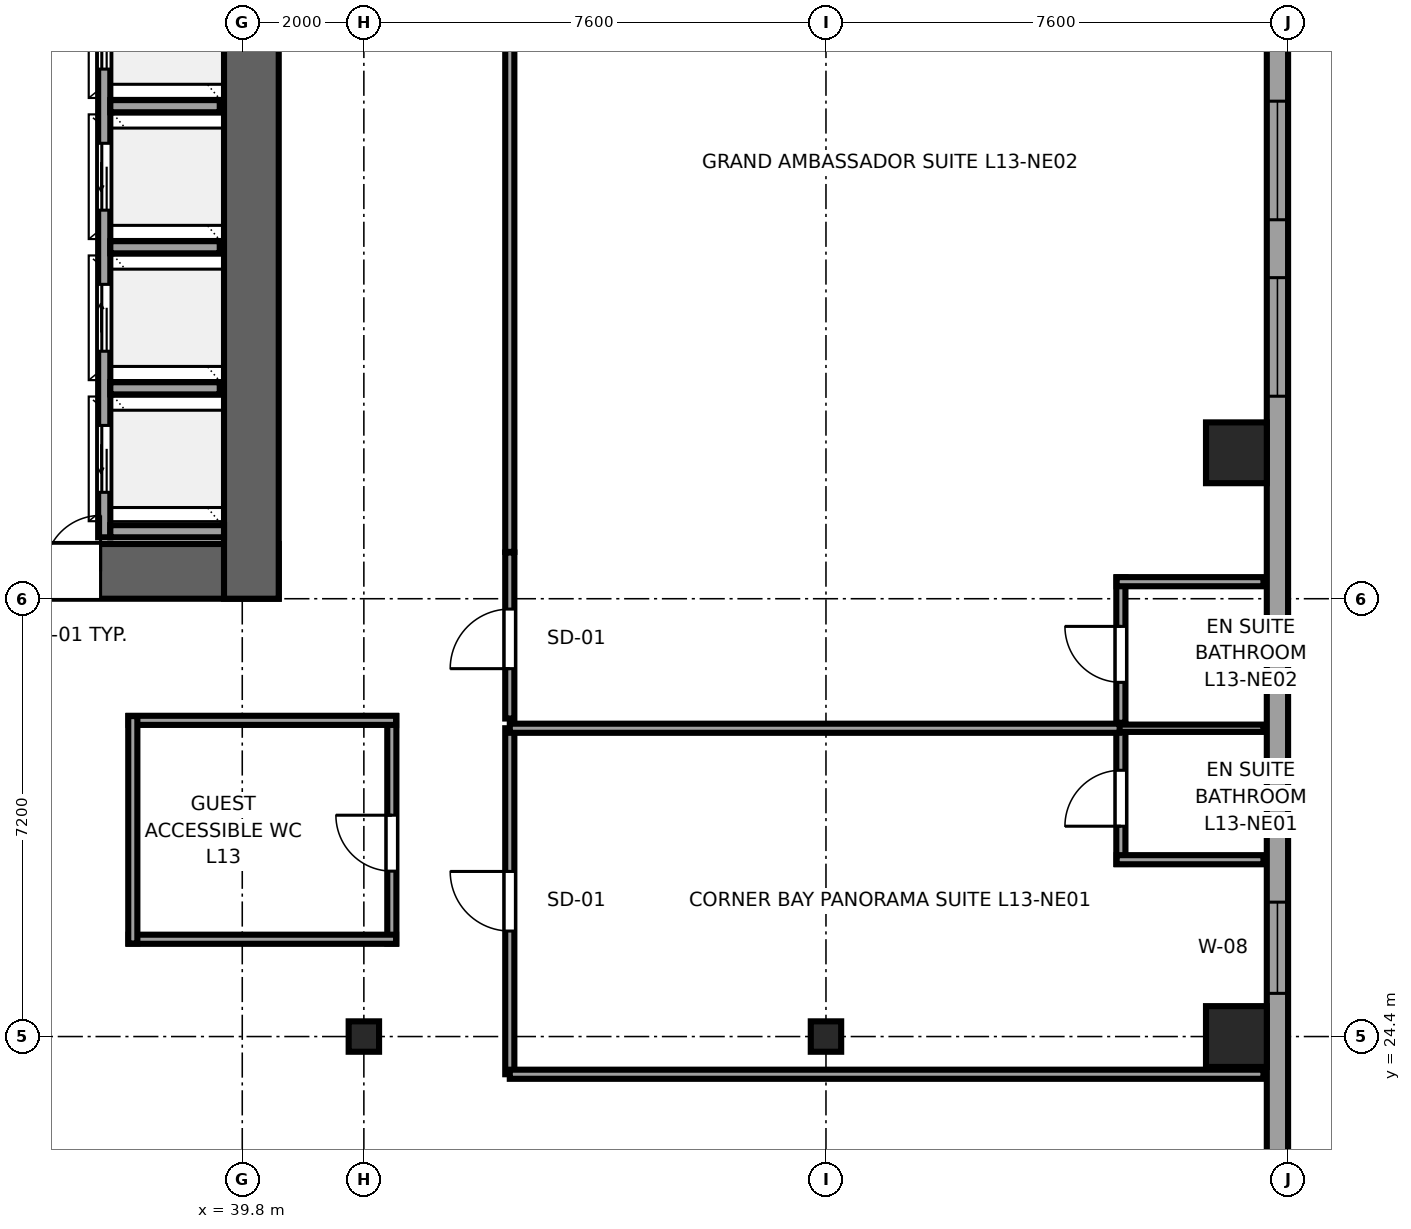
"""IFC4 building model, lengths in metres.
Left out: names, types, materials, properties, quantities, classifications, styles, units other than length and angle.
Written with IfcOpenShell. Run it as: python <this file> out.ifc"""

import sys

from ifc_helpers import new_model, si_unit, direction, frame, frame_2d, origin, origin_2d, place, context, subcontext, project, spatial, rectangle, i_section, extrude, source, transform, mapped, element, fill, save


model = new_model("IFC4")
c1 = context("Model", 3, precision=1e-05, world=origin(), true_north=direction((0.0, 1.0)))
c2 = subcontext(c1, "Body", "Model", "MODEL_VIEW")
j1 = project(units=[si_unit("LENGTHUNIT", "METRE"), si_unit("PLANEANGLEUNIT", "RADIAN")], contexts=[c1])
p1 = place(None, origin())
s1 = spatial("IfcSite", under=j1, at=p1, CompositionType="ELEMENT")
p2 = place(p1, origin())
s2 = spatial("IfcBuilding", under=s1, at=p2, CompositionType="ELEMENT")
p3 = place(p2, frame((0.0, 0.0, 56.85)))
s3 = spatial("IfcBuildingStorey", under=s2, at=p3, CompositionType="ELEMENT", Elevation=56.85)
p4 = place(p3, frame((36.4, 32.05, 0.0), z_axis=(0.0, 0.0, 1.0), x_axis=(1.0, 0.0, 0.0)))
e1 = element("IfcWall", 1, at=p4, inside=s3, PredefinedType="SHEAR", context=c2, shape_type="SweptSolid", body=[
    extrude(rectangle(XDim=4.0, YDim=0.9, at=frame_2d((2.0, 0.0))), origin(), (0.0, 0.0, 1.0), 3.55),
])
p5 = place(p4, frame((1.07, 0.0, 0.0), z_axis=(0.0, 0.0, 1.0), x_axis=(-1.0, 0.0, 0.0)))
e2 = element("IfcOpeningElement", 2, at=p5, cuts=e1, PredefinedType="OPENING", context=c2, shape_type="SweptSolid", body=[
    extrude(rectangle(XDim=0.92, YDim=2.01, at=frame_2d((0.46, 1.005))), frame((0.0, 0.46, 0.0), z_axis=(0.0, -1.0, 0.0), x_axis=(1.0, 0.0, 0.0)), (0.0, 0.0, 1.0), 0.92),
])
p6 = place(p3, frame((39.95, 31.6, 0.0), z_axis=(0.0, 0.0, 1.0), x_axis=(0.0, 1.0, 0.0)))
e3 = element("IfcWall", 3, at=p6, inside=s3, PredefinedType="SHEAR", context=c2, shape_type="SweptSolid", body=[
    extrude(rectangle(XDim=13.6, YDim=0.9, at=frame_2d((6.8, 0.0))), origin(), (0.0, 0.0, 1.0), 3.55),
])
m1 = source(origin(), c2, "Body", "SweptSolid", [
    extrude(i_section(OverallWidth=0.5, OverallDepth=0.5, WebThickness=0.028, FlangeThickness=0.045, at=origin_2d()), origin(), (0.0, 0.0, 1.0), 3.55),
])
for number, where, z_axis, x_axis in (
    (4, (41.8, 24.4, 0.0), (0.0, 0.0, 1.0), (1.0, 0.0, 0.0)),
    (5, (49.4, 24.4, 0.0), (0.0, 0.0, 1.0), (1.0, 0.0, 0.0)),
):
    element("IfcColumn", number, at=place(p3, frame(where, z_axis=z_axis, x_axis=x_axis)), inside=s3, PredefinedType="COLUMN", context=c2, shape_type="MappedRepresentation", body=[
        mapped(m1, transform((0.0, 0.0, 0.0), x_axis=(1.0, 0.0, 0.0), y_axis=(0.0, 1.0, 0.0), z_axis=(0.0, 0.0, 1.0), scale=1.0)),
    ])
m2 = source(origin(), c2, "Body", "SweptSolid", [
    extrude(rectangle(XDim=1.0, YDim=1.0, at=origin_2d()), origin(), (0.0, 0.0, 1.0), 3.55),
])
for number, where, z_axis, x_axis in (
    (6, (56.15, 24.4, 0.0), (0.0, 0.0, 1.0), (1.0, 0.0, 0.0)),
    (7, (56.15, 34.0, 0.0), (0.0, 0.0, 1.0), (1.0, 0.0, 0.0)),
):
    element("IfcColumn", number, at=place(p3, frame(where, z_axis=z_axis, x_axis=x_axis)), inside=s3, PredefinedType="COLUMN", context=c2, shape_type="MappedRepresentation", body=[
        mapped(m2, transform((0.0, 0.0, 0.0), x_axis=(1.0, 0.0, 0.0), y_axis=(0.0, 1.0, 0.0), z_axis=(0.0, 0.0, 1.0), scale=1.0)),
    ])
p7 = place(p3, frame((56.825, 4.617, 0.0), z_axis=(0.0, 0.0, 1.0), x_axis=(0.0, 1.0, 0.0)))
e8 = element("IfcWall", 8, at=p7, inside=s3, PredefinedType="SOLIDWALL", context=c2, shape_type="SweptSolid", body=[
    extrude(rectangle(XDim=36.766, YDim=0.35, at=frame_2d((18.383, 0.0))), origin(), (0.0, 0.0, 1.0), 3.37),
])
p8 = place(p7, frame((8.454, 0.0, 0.68)))
e9 = element("IfcOpeningElement", 9, at=p8, cuts=e8, PredefinedType="OPENING", context=c2, shape_type="SweptSolid", body=[
    extrude(rectangle(XDim=1.95, YDim=1.82, at=frame_2d((0.975, 0.91))), frame((0.0, 0.185, 0.0), z_axis=(0.0, -1.0, 0.0), x_axis=(1.0, 0.0, 0.0)), (0.0, 0.0, 1.0), 0.37),
])
p9 = place(p7, frame((13.456, 0.0, 0.68)))
e10 = element("IfcOpeningElement", 10, at=p9, cuts=e8, PredefinedType="OPENING", context=c2, shape_type="SweptSolid", body=[
    extrude(rectangle(XDim=1.95, YDim=1.82, at=frame_2d((0.975, 0.91))), frame((0.0, 0.185, 0.0), z_axis=(0.0, -1.0, 0.0), x_axis=(1.0, 0.0, 0.0)), (0.0, 0.0, 1.0), 0.37),
])
p10 = place(p7, frame((30.313, 0.0, 0.68)))
e11 = element("IfcOpeningElement", 11, at=p10, cuts=e8, PredefinedType="OPENING", context=c2, shape_type="SweptSolid", body=[
    extrude(rectangle(XDim=1.95, YDim=1.82, at=frame_2d((0.975, 0.91))), frame((0.0, 0.185, 0.0), z_axis=(0.0, -1.0, 0.0), x_axis=(1.0, 0.0, 0.0)), (0.0, 0.0, 1.0), 0.37),
])
p11 = place(p7, frame((33.215, 0.0, 0.68)))
e12 = element("IfcOpeningElement", 12, at=p11, cuts=e8, PredefinedType="OPENING", context=c2, shape_type="SweptSolid", body=[
    extrude(rectangle(XDim=1.95, YDim=1.82, at=frame_2d((0.975, 0.91))), frame((0.0, 0.185, 0.0), z_axis=(0.0, -1.0, 0.0), x_axis=(1.0, 0.0, 0.0)), (0.0, 0.0, 1.0), 0.37),
])
p12 = place(p7, frame((4.293, 0.0, 0.62)))
e13 = element("IfcOpeningElement", 13, at=p12, cuts=e8, PredefinedType="OPENING", context=c2, shape_type="SweptSolid", body=[
    extrude(rectangle(XDim=1.5, YDim=1.55, at=frame_2d((0.75, 0.775))), frame((0.0, 0.185, 0.0), z_axis=(0.0, -1.0, 0.0), x_axis=(1.0, 0.0, 0.0)), (0.0, 0.0, 1.0), 0.37),
])
p13 = place(p7, frame((20.493, 0.0, 0.62)))
e14 = element("IfcOpeningElement", 14, at=p13, cuts=e8, PredefinedType="OPENING", context=c2, shape_type="SweptSolid", body=[
    extrude(rectangle(XDim=1.5, YDim=1.55, at=frame_2d((0.75, 0.775))), frame((0.0, 0.185, 0.0), z_axis=(0.0, -1.0, 0.0), x_axis=(1.0, 0.0, 0.0)), (0.0, 0.0, 1.0), 0.37),
])
p14 = place(p3, frame((37.53, 32.61, 0.0), z_axis=(0.0, 0.0, 1.0), x_axis=(0.0, 1.0, 0.0)))
e15 = element("IfcWall", 15, at=p14, inside=s3, PredefinedType="SOLIDWALL", context=c2, shape_type="SweptSolid", body=[
    extrude(rectangle(XDim=9.54, YDim=0.2, at=frame_2d((4.77, 0.0))), origin(), (0.0, 0.0, 1.0), 3.37),
])
p15 = place(p14, frame((0.74, 0.0, 0.0)))
e16 = element("IfcOpeningElement", 16, at=p15, cuts=e15, PredefinedType="OPENING", context=c2, shape_type="SweptSolid", body=[
    extrude(rectangle(XDim=1.1, YDim=2.12, at=frame_2d((0.55, 1.06))), frame((0.0, 0.11, 0.0), z_axis=(0.0, -1.0, 0.0), x_axis=(1.0, 0.0, 0.0)), (0.0, 0.0, 1.0), 0.22),
])
p16 = place(p14, frame((3.06, 0.0, 0.0)))
e17 = element("IfcOpeningElement", 17, at=p16, cuts=e15, PredefinedType="OPENING", context=c2, shape_type="SweptSolid", body=[
    extrude(rectangle(XDim=1.1, YDim=2.12, at=frame_2d((0.55, 1.06))), frame((0.0, 0.11, 0.0), z_axis=(0.0, -1.0, 0.0), x_axis=(1.0, 0.0, 0.0)), (0.0, 0.0, 1.0), 0.22),
])
p17 = place(p14, frame((5.38, 0.0, 0.0)))
e18 = element("IfcOpeningElement", 18, at=p17, cuts=e15, PredefinedType="OPENING", context=c2, shape_type="SweptSolid", body=[
    extrude(rectangle(XDim=1.1, YDim=2.12, at=frame_2d((0.55, 1.06))), frame((0.0, 0.11, 0.0), z_axis=(0.0, -1.0, 0.0), x_axis=(1.0, 0.0, 0.0)), (0.0, 0.0, 1.0), 0.22),
])
p18 = place(p14, frame((7.7, 0.0, 0.0)))
e19 = element("IfcOpeningElement", 19, at=p18, cuts=e15, PredefinedType="OPENING", context=c2, shape_type="SweptSolid", body=[
    extrude(rectangle(XDim=1.1, YDim=2.12, at=frame_2d((0.55, 1.06))), frame((0.0, 0.11, 0.0), z_axis=(0.0, -1.0, 0.0), x_axis=(1.0, 0.0, 0.0)), (0.0, 0.0, 1.0), 0.22),
])
p19 = place(p3, frame((37.63, 32.71, 0.0), z_axis=(0.0, 0.0, 1.0), x_axis=(1.0, 0.0, 0.0)))
e20 = element("IfcWall", 20, at=p19, inside=s3, PredefinedType="SOLIDWALL", context=c2, shape_type="SweptSolid", body=[
    extrude(rectangle(XDim=1.87, YDim=0.2, at=frame_2d((0.935, 0.0))), origin(), (0.0, 0.0, 1.0), 3.37),
])
for number, where, z_axis, x_axis in (
    (21, (37.63, 35.06, 0.0), (0.0, 0.0, 1.0), (1.0, 0.0, 0.0)),
    (22, (37.63, 37.38, 0.0), (0.0, 0.0, 1.0), (1.0, 0.0, 0.0)),
    (23, (37.63, 39.7, 0.0), (0.0, 0.0, 1.0), (1.0, 0.0, 0.0)),
):
    element("IfcWall", number, at=place(p3, frame(where, z_axis=z_axis, x_axis=x_axis)), inside=s3, PredefinedType="SOLIDWALL", context=c2, shape_type="SweptSolid", body=[
        extrude(rectangle(XDim=1.8, YDim=0.2, at=frame_2d((0.9, 0.0))), origin(), (0.0, 0.0, 1.0), 3.37),
    ])
p20 = place(p3, frame((54.25, 27.238, 0.0), z_axis=(0.0, 0.0, 1.0), x_axis=(0.0, 1.0, 0.0)))
e24 = element("IfcWall", 24, at=p20, inside=s3, PredefinedType="PARTITIONING", context=c2, shape_type="SweptSolid", body=[
    extrude(rectangle(XDim=2.302, YDim=0.15, at=frame_2d((1.151, 0.0))), origin(), (0.0, 0.0, 1.0), 3.37),
])
p21 = place(p20, frame((0.621, 0.0, 0.0)))
e25 = element("IfcOpeningElement", 25, at=p21, cuts=e24, PredefinedType="OPENING", context=c2, shape_type="SweptSolid", body=[
    extrude(rectangle(XDim=0.92, YDim=2.01, at=frame_2d((0.46, 1.005))), frame((0.0, 0.085, 0.0), z_axis=(0.0, -1.0, 0.0), x_axis=(1.0, 0.0, 0.0)), (0.0, 0.0, 1.0), 0.17),
])
p22 = place(p3, frame((54.18, 27.308, 0.0), z_axis=(0.0, 0.0, 1.0), x_axis=(1.0, 0.0, 0.0)))
e26 = element("IfcWall", 26, at=p22, inside=s3, PredefinedType="PARTITIONING", context=c2, shape_type="SweptSolid", body=[
    extrude(rectangle(XDim=2.415, YDim=0.15, at=frame_2d((1.208, 0.0))), origin(), (0.0, 0.0, 1.0), 3.37),
])
p23 = place(p3, frame((54.18, 29.47, 0.0), z_axis=(0.0, 0.0, 1.0), x_axis=(1.0, 0.0, 0.0)))
e27 = element("IfcWall", 27, at=p23, inside=s3, PredefinedType="PLUMBINGWALL", context=c2, shape_type="SweptSolid", body=[
    extrude(rectangle(XDim=2.415, YDim=0.12, at=frame_2d((1.208, 0.0))), origin(), (0.0, 0.0, 1.0), 3.37),
])
p24 = place(p3, frame((54.25, 29.56, 0.0), z_axis=(0.0, 0.0, 1.0), x_axis=(0.0, 1.0, 0.0)))
e28 = element("IfcWall", 28, at=p24, inside=s3, PredefinedType="PARTITIONING", context=c2, shape_type="SweptSolid", body=[
    extrude(rectangle(XDim=2.39, YDim=0.15, at=frame_2d((1.195, 0.0))), origin(), (0.0, 0.0, 1.0), 3.37),
])
p25 = place(p24, frame((0.665, 0.0, 0.0)))
e29 = element("IfcOpeningElement", 29, at=p25, cuts=e28, PredefinedType="OPENING", context=c2, shape_type="SweptSolid", body=[
    extrude(rectangle(XDim=0.92, YDim=2.01, at=frame_2d((0.46, 1.005))), frame((0.0, 0.085, 0.0), z_axis=(0.0, -1.0, 0.0), x_axis=(1.0, 0.0, 0.0)), (0.0, 0.0, 1.0), 0.17),
])
p26 = place(p3, frame((54.18, 31.88, 0.0), z_axis=(0.0, 0.0, 1.0), x_axis=(1.0, 0.0, 0.0)))
e30 = element("IfcWall", 30, at=p26, inside=s3, PredefinedType="PARTITIONING", context=c2, shape_type="SweptSolid", body=[
    extrude(rectangle(XDim=2.415, YDim=0.15, at=frame_2d((1.208, 0.0))), origin(), (0.0, 0.0, 1.0), 3.37),
])
p27 = place(p3, frame((44.2, 23.78, 0.0), z_axis=(0.0, 0.0, 1.0), x_axis=(0.0, 1.0, 0.0)))
e31 = element("IfcWall", 31, at=p27, inside=s3, PredefinedType="PARTITIONING", context=c2, shape_type="SweptSolid", body=[
    extrude(rectangle(XDim=5.69, YDim=0.15, at=frame_2d((2.845, 0.0))), origin(), (0.0, 0.0, 1.0), 3.37),
])
p28 = place(p27, frame((2.355, 0.0, 0.0)))
e32 = element("IfcOpeningElement", 32, at=p28, cuts=e31, PredefinedType="OPENING", context=c2, shape_type="SweptSolid", body=[
    extrude(rectangle(XDim=0.98, YDim=2.12, at=frame_2d((0.49, 1.06))), frame((0.0, 0.085, 0.0), z_axis=(0.0, -1.0, 0.0), x_axis=(1.0, 0.0, 0.0)), (0.0, 0.0, 1.0), 0.17),
])
p29 = place(p3, frame((44.2, 23.78, 0.0), z_axis=(0.0, 0.0, 1.0), x_axis=(1.0, 0.0, 0.0)))
e33 = element("IfcWall", 33, at=p29, inside=s3, PredefinedType="PARTITIONING", context=c2, shape_type="SweptSolid", body=[
    extrude(rectangle(XDim=12.395, YDim=0.15, at=frame_2d((6.198, 0.0))), origin(), (0.0, 0.0, 1.0), 3.37),
])
p30 = place(p3, frame((44.2, 29.47, 0.0), z_axis=(0.0, 0.0, 1.0), x_axis=(1.0, 0.0, 0.0)))
e34 = element("IfcWall", 34, at=p30, inside=s3, PredefinedType="PARTITIONING", context=c2, shape_type="SweptSolid", body=[
    extrude(rectangle(XDim=10.03, YDim=0.15, at=frame_2d((5.015, 0.0))), origin(), (0.0, 0.0, 1.0), 3.37),
])
p31 = place(p3, frame((44.2, 29.63, 0.0), z_axis=(0.0, 0.0, 1.0), x_axis=(0.0, 1.0, 0.0)))
e35 = element("IfcWall", 35, at=p31, inside=s3, PredefinedType="PARTITIONING", context=c2, shape_type="SweptSolid", body=[
    extrude(rectangle(XDim=2.73, YDim=0.15, at=frame_2d((1.365, 0.0))), origin(), (0.0, 0.0, 1.0), 3.37),
])
p32 = place(p31, frame((0.82, 0.0, 0.0)))
e36 = element("IfcOpeningElement", 36, at=p32, cuts=e35, PredefinedType="OPENING", context=c2, shape_type="SweptSolid", body=[
    extrude(rectangle(XDim=0.98, YDim=2.12, at=frame_2d((0.49, 1.06))), frame((0.0, 0.085, 0.0), z_axis=(0.0, -1.0, 0.0), x_axis=(1.0, 0.0, 0.0)), (0.0, 0.0, 1.0), 0.17),
])
p33 = place(p3, frame((44.2, 32.37, 0.0), z_axis=(0.0, 0.0, 1.0), x_axis=(0.0, 1.0, 0.0)))
e37 = element("IfcWall", 37, at=p33, inside=s3, PredefinedType="PARTITIONING", context=c2, shape_type="SweptSolid", body=[
    extrude(rectangle(XDim=13.225, YDim=0.15, at=frame_2d((6.612, 0.0))), origin(), (0.0, 0.0, 1.0), 3.37),
])
p34 = place(p3, frame((42.26, 25.93, 0.0), z_axis=(0.0, 0.0, 1.0), x_axis=(0.0, 1.0, 0.0)))
e38 = element("IfcWall", 38, at=p34, inside=s3, PredefinedType="PARTITIONING", context=c2, shape_type="SweptSolid", body=[
    extrude(rectangle(XDim=3.74, YDim=0.15, at=frame_2d((1.87, 0.0))), origin(), (0.0, 0.0, 1.0), 3.37),
])
p35 = place(p34, frame((1.19, 0.0, 0.0)))
e39 = element("IfcOpeningElement", 39, at=p35, cuts=e38, PredefinedType="OPENING", context=c2, shape_type="SweptSolid", body=[
    extrude(rectangle(XDim=0.92, YDim=2.01, at=frame_2d((0.46, 1.005))), frame((0.0, 0.085, 0.0), z_axis=(0.0, -1.0, 0.0), x_axis=(1.0, 0.0, 0.0)), (0.0, 0.0, 1.0), 0.17),
])
for number, where, z_axis, x_axis in (
    (40, (37.93, 26.0, 0.0), (0.0, 0.0, 1.0), (1.0, 0.0, 0.0)),
    (41, (37.93, 29.6, 0.0), (0.0, 0.0, 1.0), (1.0, 0.0, 0.0)),
):
    element("IfcWall", number, at=place(p3, frame(where, z_axis=z_axis, x_axis=x_axis)), inside=s3, PredefinedType="PARTITIONING", context=c2, shape_type="SweptSolid", body=[
        extrude(rectangle(XDim=4.4, YDim=0.15, at=frame_2d((2.2, 0.0))), origin(), (0.0, 0.0, 1.0), 3.37),
    ])
p36 = place(p3, frame((38.0, 25.93, 0.0), z_axis=(0.0, 0.0, 1.0), x_axis=(0.0, 1.0, 0.0)))
e42 = element("IfcWall", 42, at=p36, inside=s3, PredefinedType="PARTITIONING", context=c2, shape_type="SweptSolid", body=[
    extrude(rectangle(XDim=3.74, YDim=0.15, at=frame_2d((1.87, 0.0))), origin(), (0.0, 0.0, 1.0), 3.37),
])
m3 = source(origin(), c2, "Body", "SweptSolid", [
    extrude(rectangle(XDim=1.95, YDim=1.82, at=frame_2d((0.975, 0.91))), frame((0.0, 0.09, 0.0), z_axis=(0.0, -1.0, 0.0), x_axis=(1.0, 0.0, 0.0)), (0.0, 0.0, 1.0), 0.06),
])
p37 = place(p10, origin())
e43 = element("IfcWindow", 43, at=p37, inside=s3, PartitioningType="DOUBLE_PANEL_VERTICAL", PredefinedType="WINDOW", context=c2, shape_type="MappedRepresentation", body=[
    mapped(m3, transform((0.0, 0.0, 0.0), x_axis=(1.0, 0.0, 0.0), y_axis=(0.0, 1.0, 0.0), z_axis=(0.0, 0.0, 1.0), scale=1.0)),
])
fill(e11, e43)
p38 = place(p11, origin())
e44 = element("IfcWindow", 44, at=p38, inside=s3, PartitioningType="DOUBLE_PANEL_VERTICAL", PredefinedType="WINDOW", context=c2, shape_type="MappedRepresentation", body=[
    mapped(m3, transform((0.0, 0.0, 0.0), x_axis=(1.0, 0.0, 0.0), y_axis=(0.0, 1.0, 0.0), z_axis=(0.0, 0.0, 1.0), scale=1.0)),
])
fill(e12, e44)
m4 = source(origin(), c2, "Body", "SweptSolid", [
    extrude(rectangle(XDim=1.5, YDim=1.55, at=frame_2d((0.75, 0.775))), frame((0.0, 0.09, 0.0), z_axis=(0.0, -1.0, 0.0), x_axis=(1.0, 0.0, 0.0)), (0.0, 0.0, 1.0), 0.06),
])
p39 = place(p13, origin())
e45 = element("IfcWindow", 45, at=p39, inside=s3, PartitioningType="SINGLE_PANEL", PredefinedType="WINDOW", context=c2, shape_type="MappedRepresentation", body=[
    mapped(m4, transform((0.0, 0.0, 0.0), x_axis=(1.0, 0.0, 0.0), y_axis=(0.0, 1.0, 0.0), z_axis=(0.0, 0.0, 1.0), scale=1.0)),
])
fill(e14, e45)
m5 = source(origin(), c2, "Body", "SweptSolid", [
    extrude(rectangle(XDim=0.92, YDim=2.01, at=frame_2d((0.46, 1.005))), frame((0.0, 0.025, 0.0), z_axis=(0.0, -1.0, 0.0), x_axis=(1.0, 0.0, 0.0)), (0.0, 0.0, 1.0), 0.05),
])
p40 = place(p5, origin())
e46 = element("IfcDoor", 46, at=p40, inside=s3, OperationType="SINGLE_SWING_RIGHT", PredefinedType="DOOR", context=c2, shape_type="MappedRepresentation", body=[
    mapped(m5, transform((0.0, 0.0, 0.0), x_axis=(1.0, 0.0, 0.0), y_axis=(0.0, 1.0, 0.0), z_axis=(0.0, 0.0, 1.0), scale=1.0)),
])
fill(e2, e46)
m6 = source(origin(), c2, "Body", "SweptSolid", [
    extrude(rectangle(XDim=1.1, YDim=2.12, at=frame_2d((0.55, 1.06))), frame((0.0, 0.025, 0.0), z_axis=(0.0, -1.0, 0.0), x_axis=(1.0, 0.0, 0.0)), (0.0, 0.0, 1.0), 0.05),
])
p41 = place(p15, origin())
e47 = element("IfcDoor", 47, at=p41, inside=s3, OperationType="SLIDING_TO_LEFT", PredefinedType="DOOR", context=c2, shape_type="MappedRepresentation", body=[
    mapped(m6, transform((0.0, 0.0, 0.0), x_axis=(1.0, 0.0, 0.0), y_axis=(0.0, 1.0, 0.0), z_axis=(0.0, 0.0, 1.0), scale=1.0)),
])
fill(e16, e47)
p42 = place(p16, origin())
e48 = element("IfcDoor", 48, at=p42, inside=s3, OperationType="SLIDING_TO_RIGHT", PredefinedType="DOOR", context=c2, shape_type="MappedRepresentation", body=[
    mapped(m6, transform((0.0, 0.0, 0.0), x_axis=(1.0, 0.0, 0.0), y_axis=(0.0, 1.0, 0.0), z_axis=(0.0, 0.0, 1.0), scale=1.0)),
])
fill(e17, e48)
p43 = place(p17, origin())
e49 = element("IfcDoor", 49, at=p43, inside=s3, OperationType="SLIDING_TO_LEFT", PredefinedType="DOOR", context=c2, shape_type="MappedRepresentation", body=[
    mapped(m6, transform((0.0, 0.0, 0.0), x_axis=(1.0, 0.0, 0.0), y_axis=(0.0, 1.0, 0.0), z_axis=(0.0, 0.0, 1.0), scale=1.0)),
])
fill(e18, e49)
p44 = place(p18, origin())
e50 = element("IfcDoor", 50, at=p44, inside=s3, OperationType="SLIDING_TO_RIGHT", PredefinedType="DOOR", context=c2, shape_type="MappedRepresentation", body=[
    mapped(m6, transform((0.0, 0.0, 0.0), x_axis=(1.0, 0.0, 0.0), y_axis=(0.0, 1.0, 0.0), z_axis=(0.0, 0.0, 1.0), scale=1.0)),
])
fill(e19, e50)
p45 = place(p21, origin())
e51 = element("IfcDoor", 51, at=p45, inside=s3, OperationType="SINGLE_SWING_LEFT", PredefinedType="DOOR", context=c2, shape_type="MappedRepresentation", body=[
    mapped(m5, transform((0.0, 0.0, 0.0), x_axis=(1.0, 0.0, 0.0), y_axis=(0.0, 1.0, 0.0), z_axis=(0.0, 0.0, 1.0), scale=1.0)),
])
fill(e25, e51)
p46 = place(p25, origin())
e52 = element("IfcDoor", 52, at=p46, inside=s3, OperationType="SINGLE_SWING_RIGHT", PredefinedType="DOOR", context=c2, shape_type="MappedRepresentation", body=[
    mapped(m5, transform((0.0, 0.0, 0.0), x_axis=(1.0, 0.0, 0.0), y_axis=(0.0, 1.0, 0.0), z_axis=(0.0, 0.0, 1.0), scale=1.0)),
])
fill(e29, e52)
m7 = source(origin(), c2, "Body", "SweptSolid", [
    extrude(rectangle(XDim=0.98, YDim=2.12, at=frame_2d((0.49, 1.06))), frame((0.0, 0.025, 0.0), z_axis=(0.0, -1.0, 0.0), x_axis=(1.0, 0.0, 0.0)), (0.0, 0.0, 1.0), 0.05),
])
p47 = place(p28, origin())
e53 = element("IfcDoor", 53, at=p47, inside=s3, OperationType="SINGLE_SWING_RIGHT", PredefinedType="DOOR", context=c2, shape_type="MappedRepresentation", body=[
    mapped(m7, transform((0.0, 0.0, 0.0), x_axis=(1.0, 0.0, 0.0), y_axis=(0.0, 1.0, 0.0), z_axis=(0.0, 0.0, 1.0), scale=1.0)),
])
fill(e32, e53)
p48 = place(p32, origin())
e54 = element("IfcDoor", 54, at=p48, inside=s3, OperationType="SINGLE_SWING_LEFT", PredefinedType="DOOR", context=c2, shape_type="MappedRepresentation", body=[
    mapped(m7, transform((0.0, 0.0, 0.0), x_axis=(1.0, 0.0, 0.0), y_axis=(0.0, 1.0, 0.0), z_axis=(0.0, 0.0, 1.0), scale=1.0)),
])
fill(e36, e54)
p49 = place(p35, origin())
e55 = element("IfcDoor", 55, at=p49, inside=s3, OperationType="SINGLE_SWING_RIGHT", PredefinedType="DOOR", context=c2, shape_type="MappedRepresentation", body=[
    mapped(m5, transform((0.0, 0.0, 0.0), x_axis=(1.0, 0.0, 0.0), y_axis=(0.0, 1.0, 0.0), z_axis=(0.0, 0.0, 1.0), scale=1.0)),
])
fill(e39, e55)
save(model, sys.argv[1])
